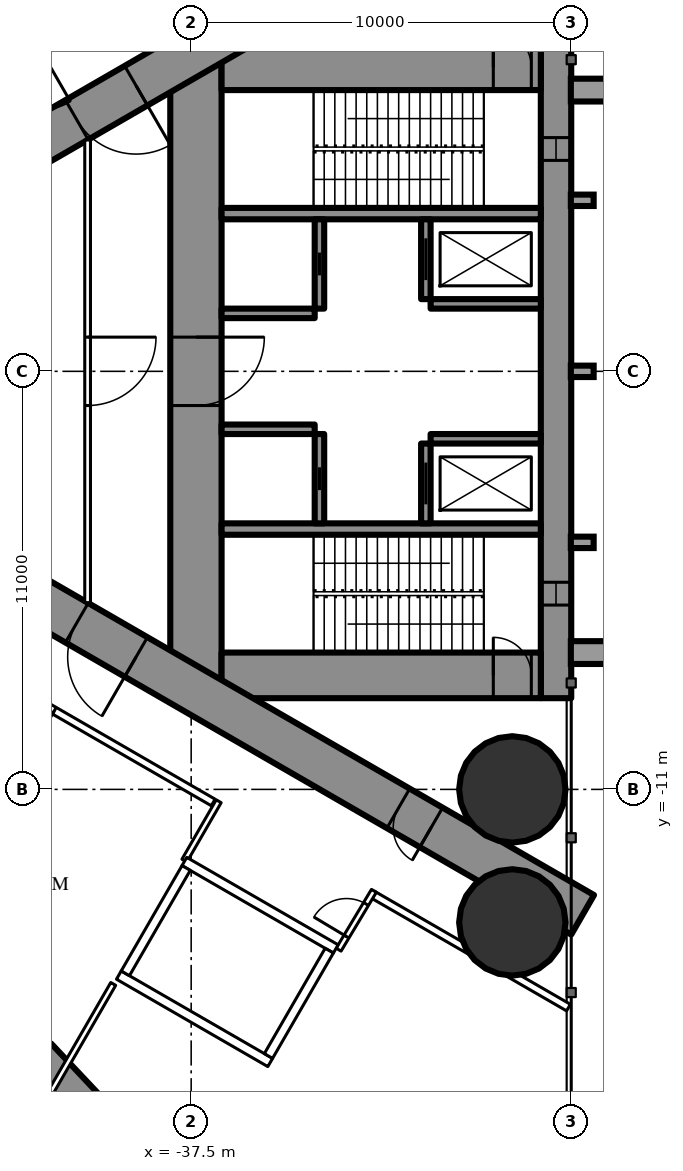
"""IFC4 building model, lengths in metres.
Left out: names, types, materials, properties, quantities, classifications, styles, units other than length and angle.
Written with IfcOpenShell. Run it as: python <this file> out.ifc"""

import sys

from ifc_helpers import new_model, si_unit, direction, frame, frame_2d, origin, origin_2d, place, context, subcontext, project, spatial, rectangle, hollow_circle, extrude, element, fill, save


model = new_model("IFC4")
c1 = context("Model", 3, precision=1e-05, world=origin(), true_north=direction((0.0, 1.0)))
c2 = subcontext(c1, "Body", "Model", "MODEL_VIEW")
j1 = project(units=[si_unit("LENGTHUNIT", "METRE"), si_unit("PLANEANGLEUNIT", "RADIAN")], contexts=[c1])
p1 = place(None, origin())
s1 = spatial("IfcSite", under=j1, at=p1, CompositionType="ELEMENT")
p2 = place(p1, origin())
s2 = spatial("IfcBuilding", under=s1, at=p2, CompositionType="ELEMENT")
p3 = place(p2, frame((0.0, 0.0, 81.0)))
s3 = spatial("IfcBuildingStorey", under=s2, at=p3, CompositionType="ELEMENT", Elevation=81.0)
for number, where, z_axis, x_axis in (
    (1, (-29.05, -11.0, 0.0), (0.0, 0.0, 1.0), (1.0, 0.0, 0.0)),
    (2, (-29.05, -14.5, 0.0), (0.0, 0.0, 1.0), (1.0, 0.0, 0.0)),
):
    element("IfcColumn", number, at=place(p3, frame(where, z_axis=z_axis, x_axis=x_axis)), inside=s3, PredefinedType="COLUMN", context=c2, shape_type="SweptSolid", body=[
        extrude(hollow_circle(Radius=1.4, WallThickness=0.12, at=origin_2d()), origin(), (0.0, 0.0, 1.0), 6.0),
    ])
p4 = place(p3, frame((-43.265, -21.567, 0.0), z_axis=(0.0, 0.0, 1.0), x_axis=(0.728105540353, 0.685465040762, 0.0)))
e3 = element("IfcWall", 3, at=p4, inside=s3, PredefinedType="SHEAR", context=c2, shape_type="SweptSolid", body=[
    extrude(rectangle(XDim=4.174, YDim=2.8, at=frame_2d((2.087, 0.0))), origin(), (0.0, 0.0, 1.0), 6.0),
])
p5 = place(p3, frame((-27.9, 8.6, 0.0), z_axis=(0.0, 0.0, 1.0), x_axis=(0.0, -1.0, 0.0)))
e4 = element("IfcWall", 4, at=p5, inside=s3, PredefinedType="SHEAR", context=c2, shape_type="SweptSolid", body=[
    extrude(rectangle(XDim=17.2, YDim=0.8, at=frame_2d((8.6, 0.0))), origin(), (0.0, 0.0, 1.0), 6.0),
])
p6 = place(p5, frame((2.45, 0.0, 0.6)))
e5 = element("IfcOpeningElement", 5, at=p6, cuts=e4, PredefinedType="OPENING", context=c2, shape_type="SweptSolid", body=[
    extrude(rectangle(XDim=0.6, YDim=4.5, at=frame_2d((0.3, 2.25))), frame((0.0, 0.41, 0.0), z_axis=(0.0, -1.0, 0.0), x_axis=(1.0, 0.0, 0.0)), (0.0, 0.0, 1.0), 0.82),
])
p7 = place(p5, frame((14.15, 0.0, 0.6)))
e6 = element("IfcOpeningElement", 6, at=p7, cuts=e4, PredefinedType="OPENING", context=c2, shape_type="SweptSolid", body=[
    extrude(rectangle(XDim=0.6, YDim=4.5, at=frame_2d((0.3, 2.25))), frame((0.0, 0.41, 0.0), z_axis=(0.0, -1.0, 0.0), x_axis=(1.0, 0.0, 0.0)), (0.0, 0.0, 1.0), 0.82),
])
p8 = place(p3, frame((-37.375, 8.6, 0.0), z_axis=(0.0, 0.0, 1.0), x_axis=(0.0, -1.0, 0.0)))
e7 = element("IfcWall", 7, at=p8, inside=s3, PredefinedType="SHEAR", context=c2, shape_type="SweptSolid", body=[
    extrude(rectangle(XDim=17.2, YDim=1.35, at=frame_2d((8.6, 0.0))), origin(), (0.0, 0.0, 1.0), 6.0),
])
p9 = place(p8, frame((7.7, 0.0, 0.0)))
e8 = element("IfcOpeningElement", 8, at=p9, cuts=e7, PredefinedType="OPENING", context=c2, shape_type="SweptSolid", body=[
    extrude(rectangle(XDim=1.8, YDim=2.2, at=frame_2d((0.9, 1.1))), frame((0.0, 0.685, 0.0), z_axis=(0.0, -1.0, 0.0), x_axis=(1.0, 0.0, 0.0)), (0.0, 0.0, 1.0), 1.37),
])
p10 = place(p3, frame((-28.3, 8.0, 0.0), z_axis=(0.0, 0.0, 1.0), x_axis=(-1.0, 0.0, 0.0)))
e9 = element("IfcWall", 9, at=p10, inside=s3, PredefinedType="SHEAR", context=c2, shape_type="SweptSolid", body=[
    extrude(rectangle(XDim=8.4, YDim=1.2, at=frame_2d((4.2, 0.0))), origin(), (0.0, 0.0, 1.0), 6.0),
])
p11 = place(p10, frame((0.25, 0.0, 0.0)))
e10 = element("IfcOpeningElement", 10, at=p11, cuts=e9, PredefinedType="OPENING", context=c2, shape_type="SweptSolid", body=[
    extrude(rectangle(XDim=1.0, YDim=2.2, at=frame_2d((0.5, 1.1))), frame((0.0, 0.61, 0.0), z_axis=(0.0, -1.0, 0.0), x_axis=(1.0, 0.0, 0.0)), (0.0, 0.0, 1.0), 1.22),
])
p12 = place(p3, frame((-28.3, -8.0, 0.0), z_axis=(0.0, 0.0, 1.0), x_axis=(-1.0, 0.0, 0.0)))
e11 = element("IfcWall", 11, at=p12, inside=s3, PredefinedType="SHEAR", context=c2, shape_type="SweptSolid", body=[
    extrude(rectangle(XDim=8.4, YDim=1.2, at=frame_2d((4.2, 0.0))), origin(), (0.0, 0.0, 1.0), 6.0),
])
p13 = place(p12, frame((0.25, 0.0, 0.0)))
e12 = element("IfcOpeningElement", 12, at=p13, cuts=e11, PredefinedType="OPENING", context=c2, shape_type="SweptSolid", body=[
    extrude(rectangle(XDim=1.0, YDim=2.2, at=frame_2d((0.5, 1.1))), frame((0.0, 0.61, 0.0), z_axis=(0.0, -1.0, 0.0), x_axis=(1.0, 0.0, 0.0)), (0.0, 0.0, 1.0), 1.22),
])
for number, where, z_axis, x_axis in (
    (13, (-28.3, 4.15, 0.0), (0.0, 0.0, 1.0), (-1.0, 0.0, 0.0)),
    (14, (-28.3, -4.15, 0.0), (0.0, 0.0, 1.0), (-1.0, 0.0, 0.0)),
):
    element("IfcWall", number, at=place(p3, frame(where, z_axis=z_axis, x_axis=x_axis)), inside=s3, PredefinedType="SHEAR", context=c2, shape_type="SweptSolid", body=[
        extrude(rectangle(XDim=8.4, YDim=0.3, at=frame_2d((4.2, 0.0))), origin(), (0.0, 0.0, 1.0), 6.0),
    ])
p14 = place(p3, frame((-31.325, 4.0, 0.0), z_axis=(0.0, 0.0, 1.0), x_axis=(0.0, -1.0, 0.0)))
e15 = element("IfcWall", 15, at=p14, inside=s3, PredefinedType="SHEAR", context=c2, shape_type="SweptSolid", body=[
    extrude(rectangle(XDim=2.1, YDim=0.25, at=frame_2d((1.05, 0.0))), origin(), (0.0, 0.0, 1.0), 6.0),
])
p15 = place(p14, frame((0.5, 0.0, 0.0)))
e16 = element("IfcOpeningElement", 16, at=p15, cuts=e15, PredefinedType="OPENING", context=c2, shape_type="SweptSolid", body=[
    extrude(rectangle(XDim=1.1, YDim=2.2, at=frame_2d((0.55, 1.1))), frame((0.0, 0.135, 0.0), z_axis=(0.0, -1.0, 0.0), x_axis=(1.0, 0.0, 0.0)), (0.0, 0.0, 1.0), 0.27),
])
p16 = place(p3, frame((-34.125, 4.0, 0.0), z_axis=(0.0, 0.0, 1.0), x_axis=(0.0, -1.0, 0.0)))
e17 = element("IfcWall", 17, at=p16, inside=s3, PredefinedType="SHEAR", context=c2, shape_type="SweptSolid", body=[
    extrude(rectangle(XDim=2.35, YDim=0.25, at=frame_2d((1.175, 0.0))), origin(), (0.0, 0.0, 1.0), 6.0),
])
p17 = place(p16, frame((0.875, 0.0, 0.0)))
e18 = element("IfcOpeningElement", 18, at=p17, cuts=e17, PredefinedType="OPENING", context=c2, shape_type="SweptSolid", body=[
    extrude(rectangle(XDim=0.6, YDim=2.0, at=frame_2d((0.3, 1.0))), frame((0.0, 0.135, 0.0), z_axis=(0.0, -1.0, 0.0), x_axis=(1.0, 0.0, 0.0)), (0.0, 0.0, 1.0), 0.27),
])
p18 = place(p3, frame((-28.3, 1.775, 0.0), z_axis=(0.0, 0.0, 1.0), x_axis=(-1.0, 0.0, 0.0)))
e19 = element("IfcWall", 19, at=p18, inside=s3, PredefinedType="SHEAR", context=c2, shape_type="SweptSolid", body=[
    extrude(rectangle(XDim=2.9, YDim=0.25, at=frame_2d((1.45, 0.0))), origin(), (0.0, 0.0, 1.0), 6.0),
])
p19 = place(p3, frame((-34.25, 1.525, 0.0), z_axis=(0.0, 0.0, 1.0), x_axis=(-1.0, 0.0, 0.0)))
e20 = element("IfcWall", 20, at=p19, inside=s3, PredefinedType="SHEAR", context=c2, shape_type="SweptSolid", body=[
    extrude(rectangle(XDim=2.45, YDim=0.25, at=frame_2d((1.225, 0.0))), origin(), (0.0, 0.0, 1.0), 6.0),
])
p20 = place(p3, frame((-31.325, -1.9, 0.0), z_axis=(0.0, 0.0, 1.0), x_axis=(0.0, -1.0, 0.0)))
e21 = element("IfcWall", 21, at=p20, inside=s3, PredefinedType="SHEAR", context=c2, shape_type="SweptSolid", body=[
    extrude(rectangle(XDim=2.1, YDim=0.25, at=frame_2d((1.05, 0.0))), origin(), (0.0, 0.0, 1.0), 6.0),
])
p21 = place(p20, frame((0.5, 0.0, 0.0)))
e22 = element("IfcOpeningElement", 22, at=p21, cuts=e21, PredefinedType="OPENING", context=c2, shape_type="SweptSolid", body=[
    extrude(rectangle(XDim=1.1, YDim=2.2, at=frame_2d((0.55, 1.1))), frame((0.0, 0.135, 0.0), z_axis=(0.0, -1.0, 0.0), x_axis=(1.0, 0.0, 0.0)), (0.0, 0.0, 1.0), 0.27),
])
p22 = place(p3, frame((-34.125, -1.65, 0.0), z_axis=(0.0, 0.0, 1.0), x_axis=(0.0, -1.0, 0.0)))
e23 = element("IfcWall", 23, at=p22, inside=s3, PredefinedType="SHEAR", context=c2, shape_type="SweptSolid", body=[
    extrude(rectangle(XDim=2.35, YDim=0.25, at=frame_2d((1.175, 0.0))), origin(), (0.0, 0.0, 1.0), 6.0),
])
p23 = place(p22, frame((0.875, 0.0, 0.0)))
e24 = element("IfcOpeningElement", 24, at=p23, cuts=e23, PredefinedType="OPENING", context=c2, shape_type="SweptSolid", body=[
    extrude(rectangle(XDim=0.6, YDim=2.0, at=frame_2d((0.3, 1.0))), frame((0.0, 0.135, 0.0), z_axis=(0.0, -1.0, 0.0), x_axis=(1.0, 0.0, 0.0)), (0.0, 0.0, 1.0), 0.27),
])
p24 = place(p3, frame((-28.3, -1.775, 0.0), z_axis=(0.0, 0.0, 1.0), x_axis=(-1.0, 0.0, 0.0)))
e25 = element("IfcWall", 25, at=p24, inside=s3, PredefinedType="SHEAR", context=c2, shape_type="SweptSolid", body=[
    extrude(rectangle(XDim=2.9, YDim=0.25, at=frame_2d((1.45, 0.0))), origin(), (0.0, 0.0, 1.0), 6.0),
])
p25 = place(p3, frame((-34.25, -1.525, 0.0), z_axis=(0.0, 0.0, 1.0), x_axis=(-1.0, 0.0, 0.0)))
e26 = element("IfcWall", 26, at=p25, inside=s3, PredefinedType="SHEAR", context=c2, shape_type="SweptSolid", body=[
    extrude(rectangle(XDim=2.45, YDim=0.25, at=frame_2d((1.225, 0.0))), origin(), (0.0, 0.0, 1.0), 6.0),
])
p26 = place(p3, frame((-27.2, 14.3, 0.0), z_axis=(0.0, 0.0, 1.0), x_axis=(-0.866026593062, -0.499997940104, 0.0)))
e27 = element("IfcWall", 27, at=p26, inside=s3, PredefinedType="SHEAR", context=c2, shape_type="SweptSolid", body=[
    extrude(rectangle(XDim=28.946, YDim=1.2, at=frame_2d((14.473, 0.0))), origin(), (0.0, 0.0, 1.0), 6.0),
])
p27 = place(p26, frame((4.6, 0.0, 0.0)))
e28 = element("IfcOpeningElement", 28, at=p27, cuts=e27, PredefinedType="OPENING", context=c2, shape_type="SweptSolid", body=[
    extrude(rectangle(XDim=1.0, YDim=2.2, at=frame_2d((0.5, 1.1))), frame((0.0, 0.61, 0.0), z_axis=(0.0, -1.0, 0.0), x_axis=(1.0, 0.0, 0.0)), (0.0, 0.0, 1.0), 1.22),
])
p28 = place(p26, frame((13.568, 0.0, 0.0)))
e29 = element("IfcOpeningElement", 29, at=p28, cuts=e27, PredefinedType="OPENING", context=c2, shape_type="SweptSolid", body=[
    extrude(rectangle(XDim=1.8, YDim=2.2, at=frame_2d((0.9, 1.1))), frame((0.0, 0.61, 0.0), z_axis=(0.0, -1.0, 0.0), x_axis=(1.0, 0.0, 0.0)), (0.0, 0.0, 1.0), 1.22),
])
p29 = place(p3, frame((-27.2, -14.3, 0.0), z_axis=(0.0, 0.0, 1.0), x_axis=(-0.866024021859, 0.500002393557, 0.0)))
e30 = element("IfcWall", 30, at=p29, inside=s3, PredefinedType="SHEAR", context=c2, shape_type="SweptSolid", body=[
    extrude(rectangle(XDim=27.907, YDim=1.2, at=frame_2d((13.954, 0.0))), origin(), (0.0, 0.0, 1.0), 6.0),
])
p30 = place(p29, frame((4.6, 0.0, 0.0)))
e31 = element("IfcOpeningElement", 31, at=p30, cuts=e30, PredefinedType="OPENING", context=c2, shape_type="SweptSolid", body=[
    extrude(rectangle(XDim=1.0, YDim=2.2, at=frame_2d((0.5, 1.1))), frame((0.0, 0.61, 0.0), z_axis=(0.0, -1.0, 0.0), x_axis=(1.0, 0.0, 0.0)), (0.0, 0.0, 1.0), 1.22),
])
p31 = place(p29, frame((13.568, 0.0, 0.0)))
e32 = element("IfcOpeningElement", 32, at=p31, cuts=e30, PredefinedType="OPENING", context=c2, shape_type="SweptSolid", body=[
    extrude(rectangle(XDim=1.8, YDim=2.2, at=frame_2d((0.9, 1.1))), frame((0.0, 0.61, 0.0), z_axis=(0.0, -1.0, 0.0), x_axis=(1.0, 0.0, 0.0)), (0.0, 0.0, 1.0), 1.22),
])
p32 = place(p3, frame((-39.551, -16.118, 0.0), z_axis=(0.0, 0.0, 1.0), x_axis=(-0.499986503906, -0.866033195618, 0.0)))
e33 = element("IfcWall", 33, at=p32, inside=s3, PredefinedType="PARTITIONING", context=c2, shape_type="SweptSolid", body=[
    extrude(rectangle(XDim=3.815, YDim=0.15, at=frame_2d((1.907, 0.0))), origin(), (0.0, 0.0, 1.0), 5.75),
])
p33 = place(p3, frame((-37.7, 10.894, 0.0), z_axis=(0.0, 0.0, 1.0), x_axis=(-0.866027905338, -0.499995667157, 0.0)))
e34 = element("IfcWall", 34, at=p33, inside=s3, PredefinedType="PARTITIONING", context=c2, shape_type="SweptSolid", body=[
    extrude(rectangle(XDim=21.787, YDim=0.2, at=frame_2d((10.894, 0.0))), origin(), (0.0, 0.0, 1.0), 5.75),
])
p34 = place(p33, frame((15.369, 0.0, 0.0)))
e35 = element("IfcOpeningElement", 35, at=p34, cuts=e34, PredefinedType="OPENING", context=c2, shape_type="SweptSolid", body=[
    extrude(rectangle(XDim=1.8, YDim=2.2, at=frame_2d((0.9, 1.1))), frame((0.0, 0.11, 0.0), z_axis=(0.0, -1.0, 0.0), x_axis=(1.0, 0.0, 0.0)), (0.0, 0.0, 1.0), 0.22),
])
p35 = place(p33, frame((4.476, 0.0, 0.0)))
e36 = element("IfcOpeningElement", 36, at=p35, cuts=e34, PredefinedType="OPENING", context=c2, shape_type="SweptSolid", body=[
    extrude(rectangle(XDim=1.8, YDim=2.2, at=frame_2d((0.9, 1.1))), frame((0.0, 0.11, 0.0), z_axis=(0.0, -1.0, 0.0), x_axis=(1.0, 0.0, 0.0)), (0.0, 0.0, 1.0), 0.22),
])
p36 = place(p3, frame((-27.572, -16.741, 0.0), z_axis=(0.0, 0.0, 1.0), x_axis=(-0.866024464444, 0.500001626982, 0.0)))
e37 = element("IfcWall", 37, at=p36, inside=s3, PredefinedType="PARTITIONING", context=c2, shape_type="SweptSolid", body=[
    extrude(rectangle(XDim=5.955, YDim=0.2, at=frame_2d((2.978, 0.0))), origin(), (0.0, 0.0, 1.0), 5.75),
])
p37 = place(p3, frame((-36.92, -11.344, 0.0), z_axis=(0.0, 0.0, 1.0), x_axis=(-0.866028313256, 0.499994960614, 0.0)))
e38 = element("IfcWall", 38, at=p37, inside=s3, PredefinedType="PARTITIONING", context=c2, shape_type="SweptSolid", body=[
    extrude(rectangle(XDim=22.568, YDim=0.2, at=frame_2d((11.284, 0.0))), origin(), (0.0, 0.0, 1.0), 5.75),
])
p38 = place(p37, frame((16.27, 0.0, 0.0)))
e39 = element("IfcOpeningElement", 39, at=p38, cuts=e38, PredefinedType="OPENING", context=c2, shape_type="SweptSolid", body=[
    extrude(rectangle(XDim=1.8, YDim=2.2, at=frame_2d((0.9, 1.1))), frame((0.0, 0.11, 0.0), z_axis=(0.0, -1.0, 0.0), x_axis=(1.0, 0.0, 0.0)), (0.0, 0.0, 1.0), 0.22),
])
p39 = place(p37, frame((4.826, 0.0, 0.0)))
e40 = element("IfcOpeningElement", 40, at=p39, cuts=e38, PredefinedType="OPENING", context=c2, shape_type="SweptSolid", body=[
    extrude(rectangle(XDim=2.0, YDim=2.4, at=frame_2d((1.0, 1.2))), frame((0.0, 0.11, 0.0), z_axis=(0.0, -1.0, 0.0), x_axis=(1.0, 0.0, 0.0)), (0.0, 0.0, 1.0), 0.22),
])
p40 = place(p3, frame((-36.776, -11.312, 0.0), z_axis=(0.0, 0.0, 1.0), x_axis=(-0.500038651731, -0.866003087047, 0.0)))
e41 = element("IfcWall", 41, at=p40, inside=s3, PredefinedType="PARTITIONING", context=c2, shape_type="SweptSolid", body=[
    extrude(rectangle(XDim=1.804, YDim=0.15, at=frame_2d((0.902, 0.0))), origin(), (0.0, 0.0, 1.0), 5.75),
])
p41 = place(p3, frame((-33.621, -15.218, 0.0), z_axis=(0.0, 0.0, 1.0), x_axis=(0.514336634837, 0.857588377991, 0.0)))
e42 = element("IfcWall", 42, at=p41, inside=s3, PredefinedType="PARTITIONING", context=c2, shape_type="SweptSolid", body=[
    extrude(rectangle(XDim=1.805, YDim=0.15, at=frame_2d((0.903, 0.0))), origin(), (0.0, 0.0, 1.0), 5.75),
])
p42 = place(p41, frame((0.403, 0.0, 0.0)))
e43 = element("IfcOpeningElement", 43, at=p42, cuts=e42, PredefinedType="OPENING", context=c2, shape_type="SweptSolid", body=[
    extrude(rectangle(XDim=1.0, YDim=2.2, at=frame_2d((0.5, 1.1))), frame((0.0, 0.085, 0.0), z_axis=(0.0, -1.0, 0.0), x_axis=(1.0, 0.0, 0.0)), (0.0, 0.0, 1.0), 0.17),
])
p43 = place(p3, frame((-40.225, 6.087, 0.0), z_axis=(0.0, 0.0, 1.0), x_axis=(0.0, -1.0, 0.0)))
e44 = element("IfcWall", 44, at=p43, inside=s3, PredefinedType="PARTITIONING", context=c2, shape_type="SweptSolid", body=[
    extrude(rectangle(XDim=12.174, YDim=0.15, at=frame_2d((6.087, 0.0))), origin(), (0.0, 0.0, 1.0), 5.75),
])
p44 = place(p43, frame((5.187, 0.0, 0.0)))
e45 = element("IfcOpeningElement", 45, at=p44, cuts=e44, PredefinedType="OPENING", context=c2, shape_type="SweptSolid", body=[
    extrude(rectangle(XDim=1.8, YDim=2.2, at=frame_2d((0.9, 1.1))), frame((0.0, 0.085, 0.0), z_axis=(0.0, -1.0, 0.0), x_axis=(1.0, 0.0, 0.0)), (0.0, 0.0, 1.0), 0.17),
])
p45 = place(p3, frame((-33.696, -15.197, 0.0), z_axis=(0.0, 0.0, 1.0), x_axis=(-0.865976953817, 0.500083908417, 0.0)))
e46 = element("IfcWall", 46, at=p45, inside=s3, PredefinedType="PARTITIONING", context=c2, shape_type="SweptSolid", body=[
    extrude(rectangle(XDim=4.599, YDim=0.25, at=frame_2d((2.3, 0.0))), origin(), (0.0, 0.0, 1.0), 5.75),
])
p46 = place(p3, frame((-35.42, -18.186, 0.0), z_axis=(0.0, 0.0, 1.0), x_axis=(-0.865990227814, 0.50006092162, 0.0)))
e47 = element("IfcWall", 47, at=p46, inside=s3, PredefinedType="PARTITIONING", context=c2, shape_type="SweptSolid", body=[
    extrude(rectangle(XDim=4.6, YDim=0.25, at=frame_2d((2.3, 0.0))), origin(), (0.0, 0.0, 1.0), 5.75),
])
p47 = place(p3, frame((-33.866, -15.243, 0.0), z_axis=(0.0, 0.0, 1.0), x_axis=(-0.499929347863, -0.866066190972, 0.0)))
e48 = element("IfcWall", 48, at=p47, inside=s3, PredefinedType="PARTITIONING", context=c2, shape_type="SweptSolid", body=[
    extrude(rectangle(XDim=3.201, YDim=0.25, at=frame_2d((1.6, 0.0))), origin(), (0.0, 0.0, 1.0), 5.75),
])
p48 = place(p3, frame((-37.633, -13.068, 0.0), z_axis=(0.0, 0.0, 1.0), x_axis=(-0.499872130319, -0.866099216793, 0.0)))
e49 = element("IfcWall", 49, at=p48, inside=s3, PredefinedType="PARTITIONING", context=c2, shape_type="SweptSolid", body=[
    extrude(rectangle(XDim=3.2, YDim=0.25, at=frame_2d((1.6, 0.0))), origin(), (0.0, 0.0, 1.0), 5.75),
])
p49 = place(p39, origin())
e50 = element("IfcDoor", 50, at=p49, inside=s3, OperationType="DOUBLE_DOOR_SINGLE_SWING", PredefinedType="DOOR", context=c2, shape_type="SweptSolid", body=[
    extrude(rectangle(XDim=2.0, YDim=2.4, at=frame_2d((1.0, 1.2))), frame((0.0, 0.025, 0.0), z_axis=(0.0, -1.0, 0.0), x_axis=(1.0, 0.0, 0.0)), (0.0, 0.0, 1.0), 0.05),
])
fill(e40, e50)
p50 = place(p42, origin())
e51 = element("IfcDoor", 51, at=p50, inside=s3, OperationType="SINGLE_SWING_LEFT", PredefinedType="DOOR", context=c2, shape_type="SweptSolid", body=[
    extrude(rectangle(XDim=1.0, YDim=2.2, at=frame_2d((0.5, 1.1))), frame((0.0, 0.025, 0.0), z_axis=(0.0, -1.0, 0.0), x_axis=(1.0, 0.0, 0.0)), (0.0, 0.0, 1.0), 0.05),
])
fill(e43, e51)
p51 = place(p44, origin())
e52 = element("IfcDoor", 52, at=p51, inside=s3, OperationType="DOUBLE_DOOR_SINGLE_SWING", PredefinedType="DOOR", context=c2, shape_type="SweptSolid", body=[
    extrude(rectangle(XDim=1.8, YDim=2.2, at=frame_2d((0.9, 1.1))), frame((0.0, 0.025, 0.0), z_axis=(0.0, -1.0, 0.0), x_axis=(1.0, 0.0, 0.0)), (0.0, 0.0, 1.0), 0.05),
])
fill(e45, e52)
p52 = place(p28, origin())
e53 = element("IfcDoor", 53, at=p52, inside=s3, OperationType="DOUBLE_DOOR_SINGLE_SWING", PredefinedType="DOOR", context=c2, shape_type="SweptSolid", body=[
    extrude(rectangle(XDim=1.8, YDim=2.2, at=frame_2d((0.9, 1.1))), frame((0.0, 0.025, 0.0), z_axis=(0.0, -1.0, 0.0), x_axis=(1.0, 0.0, 0.0)), (0.0, 0.0, 1.0), 0.05),
])
fill(e29, e53)
p53 = place(p30, origin())
e54 = element("IfcDoor", 54, at=p53, inside=s3, OperationType="SINGLE_SWING_LEFT", PredefinedType="DOOR", context=c2, shape_type="SweptSolid", body=[
    extrude(rectangle(XDim=1.0, YDim=2.2, at=frame_2d((0.5, 1.1))), frame((0.0, 0.025, 0.0), z_axis=(0.0, -1.0, 0.0), x_axis=(1.0, 0.0, 0.0)), (0.0, 0.0, 1.0), 0.05),
])
fill(e31, e54)
p54 = place(p31, origin())
e55 = element("IfcDoor", 55, at=p54, inside=s3, OperationType="DOUBLE_DOOR_SINGLE_SWING", PredefinedType="DOOR", context=c2, shape_type="SweptSolid", body=[
    extrude(rectangle(XDim=1.8, YDim=2.2, at=frame_2d((0.9, 1.1))), frame((0.0, 0.025, 0.0), z_axis=(0.0, -1.0, 0.0), x_axis=(1.0, 0.0, 0.0)), (0.0, 0.0, 1.0), 0.05),
])
fill(e32, e55)
p55 = place(p9, origin())
e56 = element("IfcDoor", 56, at=p55, inside=s3, OperationType="DOUBLE_DOOR_SINGLE_SWING", PredefinedType="DOOR", context=c2, shape_type="SweptSolid", body=[
    extrude(rectangle(XDim=1.8, YDim=2.2, at=frame_2d((0.9, 1.1))), frame((0.0, 0.025, 0.0), z_axis=(0.0, -1.0, 0.0), x_axis=(1.0, 0.0, 0.0)), (0.0, 0.0, 1.0), 0.05),
])
fill(e8, e56)
p56 = place(p11, origin())
e57 = element("IfcDoor", 57, at=p56, inside=s3, OperationType="SINGLE_SWING_RIGHT", PredefinedType="DOOR", context=c2, shape_type="SweptSolid", body=[
    extrude(rectangle(XDim=1.0, YDim=2.2, at=frame_2d((0.5, 1.1))), frame((0.0, 0.025, 0.0), z_axis=(0.0, -1.0, 0.0), x_axis=(1.0, 0.0, 0.0)), (0.0, 0.0, 1.0), 0.05),
])
fill(e10, e57)
p57 = place(p13, origin())
e58 = element("IfcDoor", 58, at=p57, inside=s3, OperationType="SINGLE_SWING_RIGHT", PredefinedType="DOOR", context=c2, shape_type="SweptSolid", body=[
    extrude(rectangle(XDim=1.0, YDim=2.2, at=frame_2d((0.5, 1.1))), frame((0.0, 0.025, 0.0), z_axis=(0.0, -1.0, 0.0), x_axis=(1.0, 0.0, 0.0)), (0.0, 0.0, 1.0), 0.05),
])
fill(e12, e58)
p58 = place(p15, origin())
e59 = element("IfcDoor", 59, at=p58, inside=s3, OperationType="SLIDING_TO_LEFT", PredefinedType="USERDEFINED", context=c2, shape_type="SweptSolid", body=[
    extrude(rectangle(XDim=1.1, YDim=2.2, at=frame_2d((0.55, 1.1))), frame((0.0, 0.025, 0.0), z_axis=(0.0, -1.0, 0.0), x_axis=(1.0, 0.0, 0.0)), (0.0, 0.0, 1.0), 0.05),
])
fill(e16, e59)
p59 = place(p21, origin())
e60 = element("IfcDoor", 60, at=p59, inside=s3, OperationType="SLIDING_TO_LEFT", PredefinedType="USERDEFINED", context=c2, shape_type="SweptSolid", body=[
    extrude(rectangle(XDim=1.1, YDim=2.2, at=frame_2d((0.55, 1.1))), frame((0.0, 0.025, 0.0), z_axis=(0.0, -1.0, 0.0), x_axis=(1.0, 0.0, 0.0)), (0.0, 0.0, 1.0), 0.05),
])
fill(e22, e60)
p60 = place(p17, origin())
e61 = element("IfcDoor", 61, at=p60, inside=s3, OperationType="SLIDING_TO_LEFT", PredefinedType="DOOR", context=c2, shape_type="SweptSolid", body=[
    extrude(rectangle(XDim=0.6, YDim=2.0, at=frame_2d((0.3, 1.0))), frame((0.0, 0.025, 0.0), z_axis=(0.0, -1.0, 0.0), x_axis=(1.0, 0.0, 0.0)), (0.0, 0.0, 1.0), 0.05),
])
fill(e18, e61)
p61 = place(p23, origin())
e62 = element("IfcDoor", 62, at=p61, inside=s3, OperationType="SLIDING_TO_LEFT", PredefinedType="DOOR", context=c2, shape_type="SweptSolid", body=[
    extrude(rectangle(XDim=0.6, YDim=2.0, at=frame_2d((0.3, 1.0))), frame((0.0, 0.025, 0.0), z_axis=(0.0, -1.0, 0.0), x_axis=(1.0, 0.0, 0.0)), (0.0, 0.0, 1.0), 0.05),
])
fill(e24, e62)
p62 = place(p6, origin())
e63 = element("IfcWindow", 63, at=p62, inside=s3, PartitioningType="SINGLE_PANEL", PredefinedType="WINDOW", context=c2, shape_type="SweptSolid", body=[
    extrude(rectangle(XDim=0.6, YDim=4.5, at=frame_2d((0.3, 2.25))), frame((0.0, 0.03, 0.0), z_axis=(0.0, -1.0, 0.0), x_axis=(1.0, 0.0, 0.0)), (0.0, 0.0, 1.0), 0.06),
])
fill(e5, e63)
p63 = place(p7, origin())
e64 = element("IfcWindow", 64, at=p63, inside=s3, PartitioningType="SINGLE_PANEL", PredefinedType="WINDOW", context=c2, shape_type="SweptSolid", body=[
    extrude(rectangle(XDim=0.6, YDim=4.5, at=frame_2d((0.3, 2.25))), frame((0.0, 0.03, 0.0), z_axis=(0.0, -1.0, 0.0), x_axis=(1.0, 0.0, 0.0)), (0.0, 0.0, 1.0), 0.06),
])
fill(e6, e64)
save(model, sys.argv[1])
